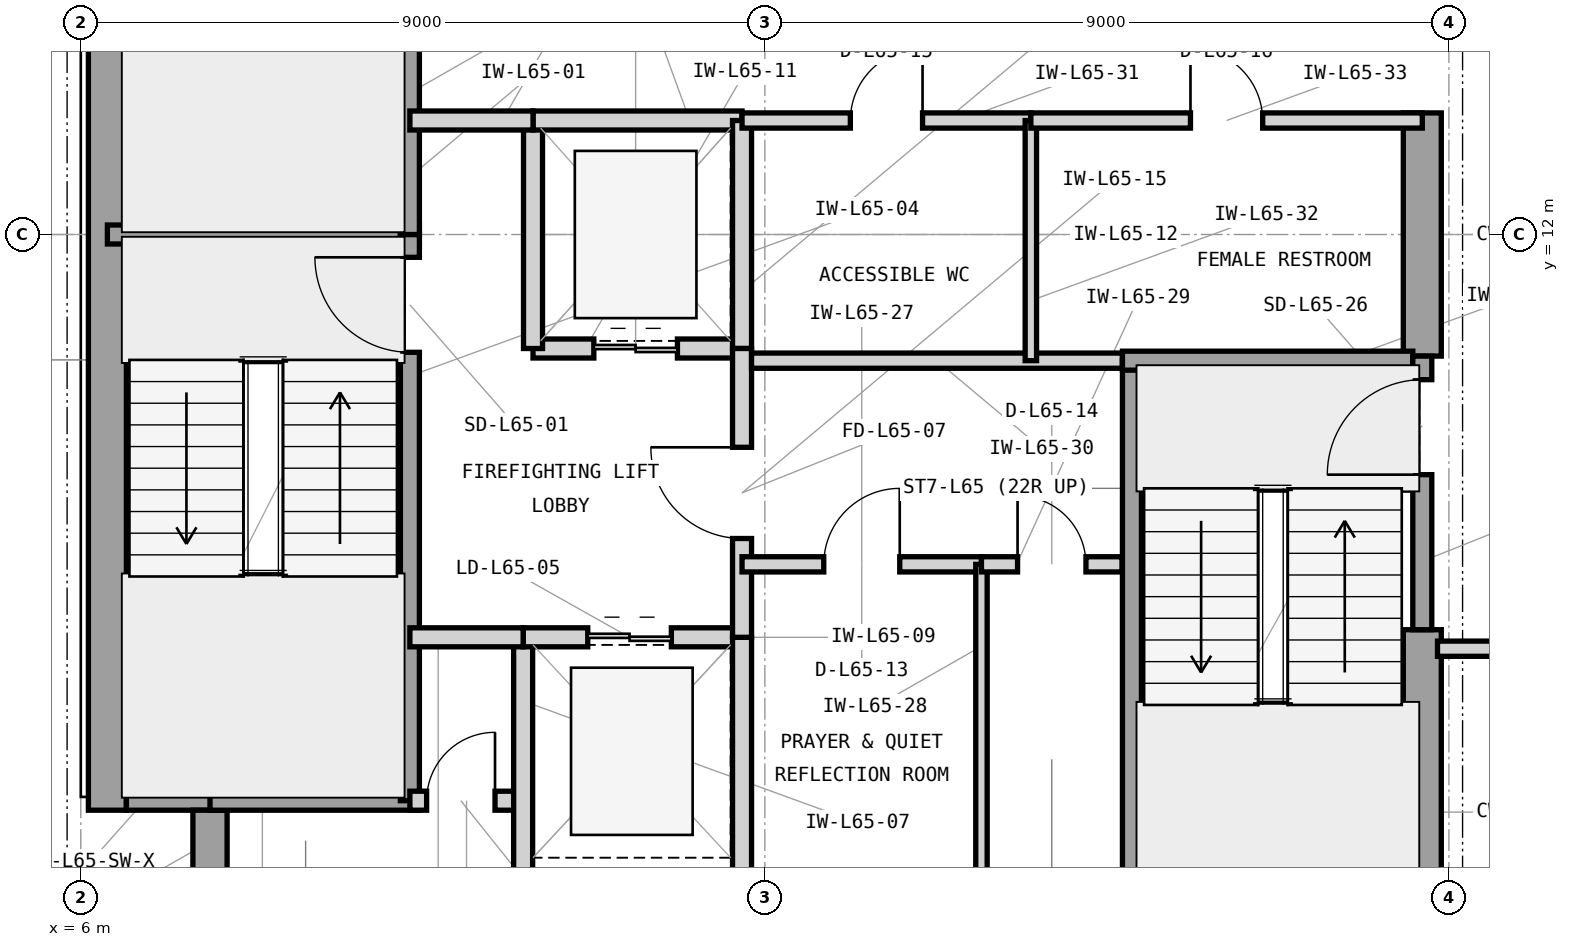
"""IFC4 building model, lengths in metres.
Left out: names, types, materials, properties, quantities, classifications, styles, units other than length and angle.
Written with IfcOpenShell. Run it as: python <this file> out.ifc"""

import sys

from ifc_helpers import new_model, si_unit, direction, frame, frame_2d, origin, place, context, subcontext, project, spatial, rectangle, extrude, element, fill, save


model = new_model("IFC4")
c1 = context("Model", 3, precision=1e-05, world=origin(), true_north=direction((0.0, 1.0)))
c2 = subcontext(c1, "Body", "Model", "MODEL_VIEW")
j1 = project(units=[si_unit("LENGTHUNIT", "METRE"), si_unit("PLANEANGLEUNIT", "RADIAN")], contexts=[c1])
p1 = place(None, origin())
s1 = spatial("IfcSite", under=j1, at=p1, CompositionType="ELEMENT")
p2 = place(p1, origin())
s2 = spatial("IfcBuilding", under=s1, at=p2, CompositionType="ELEMENT")
p3 = place(p2, frame((0.0, 0.0, 266.4)))
s3 = spatial("IfcBuildingStorey", under=s2, at=p3, CompositionType="ELEMENT", Elevation=266.4)
p4 = place(p3, frame((6.35, 4.425, 0.0), z_axis=(0.0, 0.0, 1.0), x_axis=(0.0, 1.0, 0.0)))
e1 = element("IfcWall", 1, at=p4, inside=s3, PredefinedType="SHEAR", context=c2, shape_type="SweptSolid", body=[
    extrude(rectangle(XDim=15.15, YDim=0.5, at=frame_2d((7.575, 0.0))), origin(), (0.0, 0.0, 1.0), 3.9),
])
p5 = place(p3, frame((23.65, 3.6, 0.0), z_axis=(0.0, 0.0, 1.0), x_axis=(0.0, 1.0, 0.0)))
e2 = element("IfcWall", 2, at=p5, inside=s3, PredefinedType="SHEAR", context=c2, shape_type="SweptSolid", body=[
    extrude(rectangle(XDim=3.2, YDim=0.5, at=frame_2d((1.6, 0.0))), origin(), (0.0, 0.0, 1.0), 3.9),
])
p6 = place(p3, frame((23.65, 10.4, 0.0), z_axis=(0.0, 0.0, 1.0), x_axis=(0.0, 1.0, 0.0)))
e3 = element("IfcWall", 3, at=p6, inside=s3, PredefinedType="SHEAR", context=c2, shape_type="SweptSolid", body=[
    extrude(rectangle(XDim=3.2, YDim=0.5, at=frame_2d((1.6, 0.0))), origin(), (0.0, 0.0, 1.0), 3.9),
])
p7 = place(p3, frame((6.6, 4.65, 0.0), z_axis=(0.0, 0.0, 1.0), x_axis=(1.0, 0.0, 0.0)))
e4 = element("IfcWall", 4, at=p7, inside=s3, PredefinedType="SHEAR", context=c2, shape_type="SweptSolid", body=[
    extrude(rectangle(XDim=1.325, YDim=0.45, at=frame_2d((0.663, 0.0))), origin(), (0.0, 0.0, 1.0), 3.9),
])
p8 = place(p3, frame((7.7, 3.6, 0.0), z_axis=(0.0, 0.0, 1.0), x_axis=(0.0, 1.0, 0.0)))
e5 = element("IfcWall", 5, at=p8, inside=s3, PredefinedType="SHEAR", context=c2, shape_type="SweptSolid", body=[
    extrude(rectangle(XDim=0.825, YDim=0.45, at=frame_2d((0.413, 0.0))), origin(), (0.0, 0.0, 1.0), 3.9),
])
p9 = place(p3, frame((6.35, 12.0, 0.0), z_axis=(0.0, 0.0, 1.0), x_axis=(1.0, 0.0, 0.0)))
e6 = element("IfcWall", 6, at=p9, inside=s3, PredefinedType="SHEAR", context=c2, shape_type="SweptSolid", body=[
    extrude(rectangle(XDim=4.105, YDim=0.25, at=frame_2d((2.052, 0.0))), origin(), (0.0, 0.0, 1.0), 3.9),
])
p10 = place(p3, frame((7.7, 4.55, 0.0), z_axis=(0.0, 0.0, 1.0), x_axis=(1.0, 0.0, 0.0)))
e7 = element("IfcWall", 7, at=p10, inside=s3, PredefinedType="SHEAR", context=c2, shape_type="SweptSolid", body=[
    extrude(rectangle(XDim=2.755, YDim=0.25, at=frame_2d((1.377, 0.0))), origin(), (0.0, 0.0, 1.0), 3.9),
])
p11 = place(p3, frame((10.33, 4.55, 0.0), z_axis=(0.0, 0.0, 1.0), x_axis=(0.0, 1.0, 0.0)))
e8 = element("IfcWall", 8, at=p11, inside=s3, PredefinedType="SHEAR", context=c2, shape_type="SweptSolid", body=[
    extrude(rectangle(XDim=7.45, YDim=0.25, at=frame_2d((3.725, 0.0))), origin(), (0.0, 0.0, 1.0), 3.9),
])
p12 = place(p11, frame((5.9, 0.0, 0.0)))
e9 = element("IfcOpeningElement", 9, at=p12, cuts=e8, PredefinedType="OPENING", context=c2, shape_type="SweptSolid", body=[
    extrude(rectangle(XDim=1.25, YDim=2.2, at=frame_2d((0.625, 1.1))), frame((0.0, 0.135, 0.0), z_axis=(0.0, -1.0, 0.0), x_axis=(1.0, 0.0, 0.0)), (0.0, 0.0, 1.0), 0.27),
])
p13 = place(p3, frame((10.33, 12.0, 0.0), z_axis=(0.0, 0.0, 1.0), x_axis=(0.0, 1.0, 0.0)))
e10 = element("IfcWall", 10, at=p13, inside=s3, PredefinedType="SHEAR", context=c2, shape_type="SweptSolid", body=[
    extrude(rectangle(XDim=7.45, YDim=0.25, at=frame_2d((3.725, 0.0))), origin(), (0.0, 0.0, 1.0), 3.9),
])
p14 = place(p13, frame((5.85, 0.0, 0.0)))
e11 = element("IfcOpeningElement", 11, at=p14, cuts=e10, PredefinedType="OPENING", context=c2, shape_type="SweptSolid", body=[
    extrude(rectangle(XDim=1.25, YDim=2.2, at=frame_2d((0.625, 1.1))), frame((0.0, 0.135, 0.0), z_axis=(0.0, -1.0, 0.0), x_axis=(1.0, 0.0, 0.0)), (0.0, 0.0, 1.0), 0.27),
])
p15 = place(p3, frame((10.33, 4.55, 0.0), z_axis=(0.0, 0.0, 1.0), x_axis=(1.0, 0.0, 0.0)))
e12 = element("IfcWall", 12, at=p15, inside=s3, PredefinedType="PARTITIONING", context=c2, shape_type="SweptSolid", body=[
    extrude(rectangle(XDim=1.49, YDim=0.25, at=frame_2d((0.745, 0.0))), origin(), (0.0, 0.0, 1.0), 3.705),
])
p16 = place(p15, frame((0.22, 0.0, 0.0)))
e13 = element("IfcOpeningElement", 13, at=p16, cuts=e12, PredefinedType="OPENING", context=c2, shape_type="SweptSolid", body=[
    extrude(rectangle(XDim=0.9, YDim=2.1, at=frame_2d((0.45, 1.05))), frame((0.0, 0.135, 0.0), z_axis=(0.0, -1.0, 0.0), x_axis=(1.0, 0.0, 0.0)), (0.0, 0.0, 1.0), 0.27),
])
p17 = place(p3, frame((11.82, 3.35, 0.0), z_axis=(0.0, 0.0, 1.0), x_axis=(0.0, 1.0, 0.0)))
e14 = element("IfcWall", 14, at=p17, inside=s3, PredefinedType="PARTITIONING", context=c2, shape_type="SweptSolid", body=[
    extrude(rectangle(XDim=3.35, YDim=0.25, at=frame_2d((1.675, 0.0))), origin(), (0.0, 0.0, 1.0), 3.705),
])
p18 = place(p3, frame((11.82, 6.7, 0.0), z_axis=(0.0, 0.0, 1.0), x_axis=(1.0, 0.0, 0.0)))
e15 = element("IfcWall", 15, at=p18, inside=s3, PredefinedType="PARTITIONING", context=c2, shape_type="SweptSolid", body=[
    extrude(rectangle(XDim=2.88, YDim=0.25, at=frame_2d((1.44, 0.0))), origin(), (0.0, 0.0, 1.0), 3.088),
])
p19 = place(p18, frame((0.85, 0.0, 0.0)))
e16 = element("IfcOpeningElement", 16, at=p19, cuts=e15, PredefinedType="OPENING", context=c2, shape_type="SweptSolid", body=[
    extrude(rectangle(XDim=1.1, YDim=2.25, at=frame_2d((0.55, 1.125))), frame((0.0, 0.135, 0.0), z_axis=(0.0, -1.0, 0.0), x_axis=(1.0, 0.0, 0.0)), (0.0, 0.0, 1.0), 0.27),
])
p20 = place(p3, frame((14.7, 3.35, 0.0), z_axis=(0.0, 0.0, 1.0), x_axis=(0.0, 1.0, 0.0)))
e17 = element("IfcWall", 17, at=p20, inside=s3, PredefinedType="PARTITIONING", context=c2, shape_type="SweptSolid", body=[
    extrude(rectangle(XDim=3.35, YDim=0.25, at=frame_2d((1.675, 0.0))), origin(), (0.0, 0.0, 1.0), 3.705),
])
p21 = place(p3, frame((11.95, 10.5, 0.0), z_axis=(0.0, 0.0, 1.0), x_axis=(1.0, 0.0, 0.0)))
e18 = element("IfcWall", 18, at=p21, inside=s3, PredefinedType="PARTITIONING", context=c2, shape_type="SweptSolid", body=[
    extrude(rectangle(XDim=2.75, YDim=0.25, at=frame_2d((1.375, 0.0))), origin(), (0.0, 0.0, 1.0), 3.088),
])
p22 = place(p21, frame((0.8, 0.0, 0.0)))
e19 = element("IfcOpeningElement", 19, at=p22, cuts=e18, PredefinedType="OPENING", context=c2, shape_type="SweptSolid", body=[
    extrude(rectangle(XDim=1.1, YDim=2.25, at=frame_2d((0.55, 1.125))), frame((0.0, 0.135, 0.0), z_axis=(0.0, -1.0, 0.0), x_axis=(1.0, 0.0, 0.0)), (0.0, 0.0, 1.0), 0.27),
])
p23 = place(p3, frame((11.95, 10.5, 0.0), z_axis=(0.0, 0.0, 1.0), x_axis=(0.0, 1.0, 0.0)))
e20 = element("IfcWall", 20, at=p23, inside=s3, PredefinedType="PARTITIONING", context=c2, shape_type="SweptSolid", body=[
    extrude(rectangle(XDim=3.0, YDim=0.25, at=frame_2d((1.5, 0.0))), origin(), (0.0, 0.0, 1.0), 3.705),
])
p24 = place(p3, frame((11.95, 13.5, 0.0), z_axis=(0.0, 0.0, 1.0), x_axis=(1.0, 0.0, 0.0)))
e21 = element("IfcWall", 21, at=p24, inside=s3, PredefinedType="PARTITIONING", context=c2, shape_type="SweptSolid", body=[
    extrude(rectangle(XDim=2.75, YDim=0.25, at=frame_2d((1.375, 0.0))), origin(), (0.0, 0.0, 1.0), 3.088),
])
p25 = place(p3, frame((14.7, 10.5, 0.0), z_axis=(0.0, 0.0, 1.0), x_axis=(0.0, 1.0, 0.0)))
e22 = element("IfcWall", 22, at=p25, inside=s3, PredefinedType="PARTITIONING", context=c2, shape_type="SweptSolid", body=[
    extrude(rectangle(XDim=3.0, YDim=0.25, at=frame_2d((1.5, 0.0))), origin(), (0.0, 0.0, 1.0), 3.705),
])
p26 = place(p3, frame((14.7, 6.7, 0.0), z_axis=(0.0, 0.0, 1.0), x_axis=(0.0, 1.0, 0.0)))
e23 = element("IfcWall", 23, at=p26, inside=s3, PredefinedType="PARTITIONING", context=c2, shape_type="SweptSolid", body=[
    extrude(rectangle(XDim=3.8, YDim=0.25, at=frame_2d((1.9, 0.0))), origin(), (0.0, 0.0, 1.0), 3.705),
])
p27 = place(p26, frame((1.3, 0.0, 0.0)))
e24 = element("IfcOpeningElement", 24, at=p27, cuts=e23, PredefinedType="OPENING", context=c2, shape_type="SweptSolid", body=[
    extrude(rectangle(XDim=1.2, YDim=2.2, at=frame_2d((0.6, 1.1))), frame((0.0, 0.135, 0.0), z_axis=(0.0, -1.0, 0.0), x_axis=(1.0, 0.0, 0.0)), (0.0, 0.0, 1.0), 0.27),
])
p28 = place(p3, frame((10.33, 13.5, 0.0), z_axis=(0.0, 0.0, 1.0), x_axis=(1.0, 0.0, 0.0)))
e25 = element("IfcWall", 25, at=p28, inside=s3, PredefinedType="PARTITIONING", context=c2, shape_type="SweptSolid", body=[
    extrude(rectangle(XDim=1.62, YDim=0.25, at=frame_2d((0.81, 0.0))), origin(), (0.0, 0.0, 1.0), 3.088),
])
p29 = place(p3, frame((10.33, 6.7, 0.0), z_axis=(0.0, 0.0, 1.0), x_axis=(1.0, 0.0, 0.0)))
e26 = element("IfcWall", 26, at=p29, inside=s3, PredefinedType="PARTITIONING", context=c2, shape_type="SweptSolid", body=[
    extrude(rectangle(XDim=1.49, YDim=0.25, at=frame_2d((0.745, 0.0))), origin(), (0.0, 0.0, 1.0), 3.088),
])
p30 = place(p3, frame((14.7, 7.66, 0.0), z_axis=(0.0, 0.0, 1.0), x_axis=(1.0, 0.0, 0.0)))
e27 = element("IfcWall", 27, at=p30, inside=s3, PredefinedType="PARTITIONING", context=c2, shape_type="SweptSolid", body=[
    extrude(rectangle(XDim=3.15, YDim=0.2, at=frame_2d((1.575, 0.0))), origin(), (0.0, 0.0, 1.0), 3.705),
])
p31 = place(p30, frame((1.075, 0.0, 0.0)))
e28 = element("IfcOpeningElement", 28, at=p31, cuts=e27, PredefinedType="OPENING", context=c2, shape_type="SweptSolid", body=[
    extrude(rectangle(XDim=1.0, YDim=2.15, at=frame_2d((0.5, 1.075))), frame((0.0, 0.11, 0.0), z_axis=(0.0, -1.0, 0.0), x_axis=(1.0, 0.0, 0.0)), (0.0, 0.0, 1.0), 0.22),
])
p32 = place(p3, frame((17.85, 3.35, 0.0), z_axis=(0.0, 0.0, 1.0), x_axis=(0.0, 1.0, 0.0)))
e29 = element("IfcWall", 29, at=p32, inside=s3, PredefinedType="PARTITIONING", context=c2, shape_type="SweptSolid", body=[
    extrude(rectangle(XDim=4.31, YDim=0.15, at=frame_2d((2.155, 0.0))), origin(), (0.0, 0.0, 1.0), 3.705),
])
p33 = place(p3, frame((17.85, 7.66, 0.0), z_axis=(0.0, 0.0, 1.0), x_axis=(1.0, 0.0, 0.0)))
e30 = element("IfcWall", 30, at=p33, inside=s3, PredefinedType="PARTITIONING", context=c2, shape_type="SweptSolid", body=[
    extrude(rectangle(XDim=1.85, YDim=0.2, at=frame_2d((0.925, 0.0))), origin(), (0.0, 0.0, 1.0), 3.705),
])
p34 = place(p33, frame((0.475, 0.0, 0.0)))
e31 = element("IfcOpeningElement", 31, at=p34, cuts=e30, PredefinedType="OPENING", context=c2, shape_type="SweptSolid", body=[
    extrude(rectangle(XDim=0.9, YDim=2.1, at=frame_2d((0.45, 1.05))), frame((0.0, 0.11, 0.0), z_axis=(0.0, -1.0, 0.0), x_axis=(1.0, 0.0, 0.0)), (0.0, 0.0, 1.0), 0.22),
])
p35 = place(p3, frame((14.825, 10.34, 0.0), z_axis=(0.0, 0.0, 1.0), x_axis=(1.0, 0.0, 0.0)))
e32 = element("IfcWall", 32, at=p35, inside=s3, PredefinedType="PARTITIONING", context=c2, shape_type="SweptSolid", body=[
    extrude(rectangle(XDim=4.88, YDim=0.2, at=frame_2d((2.44, 0.0))), origin(), (0.0, 0.0, 1.0), 3.088),
])
p36 = place(p3, frame((14.7, 13.5, 0.0), z_axis=(0.0, 0.0, 1.0), x_axis=(1.0, 0.0, 0.0)))
e33 = element("IfcWall", 33, at=p36, inside=s3, PredefinedType="PARTITIONING", context=c2, shape_type="SweptSolid", body=[
    extrude(rectangle(XDim=3.8, YDim=0.2, at=frame_2d((1.9, 0.0))), origin(), (0.0, 0.0, 1.0), 3.088),
])
p37 = place(p36, frame((1.425, 0.0, 0.0)))
e34 = element("IfcOpeningElement", 34, at=p37, cuts=e33, PredefinedType="OPENING", context=c2, shape_type="SweptSolid", body=[
    extrude(rectangle(XDim=0.95, YDim=2.1, at=frame_2d((0.475, 1.05))), frame((0.0, 0.11, 0.0), z_axis=(0.0, -1.0, 0.0), x_axis=(1.0, 0.0, 0.0)), (0.0, 0.0, 1.0), 0.22),
])
p38 = place(p3, frame((18.5, 10.34, 0.0), z_axis=(0.0, 0.0, 1.0), x_axis=(0.0, 1.0, 0.0)))
e35 = element("IfcWall", 35, at=p38, inside=s3, PredefinedType="PARTITIONING", context=c2, shape_type="SweptSolid", body=[
    extrude(rectangle(XDim=3.16, YDim=0.15, at=frame_2d((1.58, 0.0))), origin(), (0.0, 0.0, 1.0), 3.705),
])
p39 = place(p3, frame((18.5, 13.5, 0.0), z_axis=(0.0, 0.0, 1.0), x_axis=(1.0, 0.0, 0.0)))
e36 = element("IfcWall", 36, at=p39, inside=s3, PredefinedType="PARTITIONING", context=c2, shape_type="SweptSolid", body=[
    extrude(rectangle(XDim=5.15, YDim=0.2, at=frame_2d((2.575, 0.0))), origin(), (0.0, 0.0, 1.0), 3.088),
])
p40 = place(p39, frame((2.1, 0.0, 0.0)))
e37 = element("IfcOpeningElement", 37, at=p40, cuts=e36, PredefinedType="OPENING", context=c2, shape_type="SweptSolid", body=[
    extrude(rectangle(XDim=0.95, YDim=2.1, at=frame_2d((0.475, 1.05))), frame((0.0, 0.11, 0.0), z_axis=(0.0, -1.0, 0.0), x_axis=(1.0, 0.0, 0.0)), (0.0, 0.0, 1.0), 0.22),
])
p41 = place(p3, frame((23.85, 6.55, 0.0), z_axis=(0.0, 0.0, 1.0), x_axis=(1.0, 0.0, 0.0)))
e38 = element("IfcWall", 38, at=p41, inside=s3, PredefinedType="PARTITIONING", context=c2, shape_type="SweptSolid", body=[
    extrude(rectangle(XDim=7.35, YDim=0.2, at=frame_2d((3.675, 0.0))), origin(), (0.0, 0.0, 1.0), 3.705),
])
p42 = place(p41, frame((2.8, 0.0, 0.0)))
e39 = element("IfcOpeningElement", 39, at=p42, cuts=e38, PredefinedType="OPENING", context=c2, shape_type="SweptSolid", body=[
    extrude(rectangle(XDim=1.0, YDim=2.15, at=frame_2d((0.5, 1.075))), frame((0.0, 0.11, 0.0), z_axis=(0.0, -1.0, 0.0), x_axis=(1.0, 0.0, 0.0)), (0.0, 0.0, 1.0), 0.22),
])
p43 = place(p3, frame((19.83, 3.6, 0.0), z_axis=(0.0, 0.0, 1.0), x_axis=(0.0, 1.0, 0.0)))
e40 = element("IfcWall", 40, at=p43, inside=s3, PredefinedType="SHEAR", context=c2, shape_type="SweptSolid", body=[
    extrude(rectangle(XDim=6.74, YDim=0.25, at=frame_2d((3.37, 0.0))), origin(), (0.0, 0.0, 1.0), 3.9),
])
p44 = place(p3, frame((19.705, 10.34, 0.0), z_axis=(0.0, 0.0, 1.0), x_axis=(1.0, 0.0, 0.0)))
e41 = element("IfcWall", 41, at=p44, inside=s3, PredefinedType="SHEAR", context=c2, shape_type="SweptSolid", body=[
    extrude(rectangle(XDim=3.82, YDim=0.25, at=frame_2d((1.91, 0.0))), origin(), (0.0, 0.0, 1.0), 3.9),
])
p45 = place(p3, frame((23.65, 6.8, 0.0), z_axis=(0.0, 0.0, 1.0), x_axis=(0.0, 1.0, 0.0)))
e42 = element("IfcWall", 42, at=p45, inside=s3, PredefinedType="SHEAR", context=c2, shape_type="SweptSolid", body=[
    extrude(rectangle(XDim=3.6, YDim=0.25, at=frame_2d((1.8, 0.0))), origin(), (0.0, 0.0, 1.0), 3.9),
])
p46 = place(p45, frame((2.04, 0.0, 0.0)))
e43 = element("IfcOpeningElement", 43, at=p46, cuts=e42, PredefinedType="OPENING", context=c2, shape_type="SweptSolid", body=[
    extrude(rectangle(XDim=1.25, YDim=2.2, at=frame_2d((0.625, 1.1))), frame((0.0, 0.135, 0.0), z_axis=(0.0, -1.0, 0.0), x_axis=(1.0, 0.0, 0.0)), (0.0, 0.0, 1.0), 0.27),
])
p47 = place(p12, origin())
e44 = element("IfcDoor", 44, at=p47, inside=s3, OperationType="SINGLE_SWING_RIGHT", PredefinedType="DOOR", context=c2, shape_type="SweptSolid", body=[
    extrude(rectangle(XDim=1.25, YDim=2.2, at=frame_2d((0.625, 1.1))), frame((0.0, 0.025, 0.0), z_axis=(0.0, -1.0, 0.0), x_axis=(1.0, 0.0, 0.0)), (0.0, 0.0, 1.0), 0.05),
])
fill(e9, e44)
p48 = place(p16, origin())
e45 = element("IfcDoor", 45, at=p48, inside=s3, OperationType="SINGLE_SWING_RIGHT", PredefinedType="TRAPDOOR", context=c2, shape_type="SweptSolid", body=[
    extrude(rectangle(XDim=0.9, YDim=2.1, at=frame_2d((0.45, 1.05))), frame((0.0, 0.025, 0.0), z_axis=(0.0, -1.0, 0.0), x_axis=(1.0, 0.0, 0.0)), (0.0, 0.0, 1.0), 0.05),
])
fill(e13, e45)
p49 = place(p19, origin())
e46 = element("IfcDoor", 46, at=p49, inside=s3, OperationType="DOUBLE_DOOR_SLIDING", PredefinedType="DOOR", context=c2, shape_type="SweptSolid", body=[
    extrude(rectangle(XDim=1.1, YDim=2.25, at=frame_2d((0.55, 1.125))), frame((0.0, 0.025, 0.0), z_axis=(0.0, -1.0, 0.0), x_axis=(1.0, 0.0, 0.0)), (0.0, 0.0, 1.0), 0.05),
])
fill(e16, e46)
p50 = place(p22, origin())
e47 = element("IfcDoor", 47, at=p50, inside=s3, OperationType="DOUBLE_DOOR_SLIDING", PredefinedType="DOOR", context=c2, shape_type="SweptSolid", body=[
    extrude(rectangle(XDim=1.1, YDim=2.25, at=frame_2d((0.55, 1.125))), frame((0.0, 0.025, 0.0), z_axis=(0.0, -1.0, 0.0), x_axis=(1.0, 0.0, 0.0)), (0.0, 0.0, 1.0), 0.05),
])
fill(e19, e47)
p51 = place(p27, origin())
e48 = element("IfcDoor", 48, at=p51, inside=s3, OperationType="SINGLE_SWING_RIGHT", PredefinedType="DOOR", context=c2, shape_type="SweptSolid", body=[
    extrude(rectangle(XDim=1.2, YDim=2.2, at=frame_2d((0.6, 1.1))), frame((0.0, 0.025, 0.0), z_axis=(0.0, -1.0, 0.0), x_axis=(1.0, 0.0, 0.0)), (0.0, 0.0, 1.0), 0.05),
])
fill(e24, e48)
p52 = place(p31, origin())
e49 = element("IfcDoor", 49, at=p52, inside=s3, OperationType="SINGLE_SWING_RIGHT", PredefinedType="DOOR", context=c2, shape_type="SweptSolid", body=[
    extrude(rectangle(XDim=1.0, YDim=2.15, at=frame_2d((0.5, 1.075))), frame((0.0, 0.025, 0.0), z_axis=(0.0, -1.0, 0.0), x_axis=(1.0, 0.0, 0.0)), (0.0, 0.0, 1.0), 0.05),
])
fill(e28, e49)
p53 = place(p34, origin())
e50 = element("IfcDoor", 50, at=p53, inside=s3, OperationType="SINGLE_SWING_LEFT", PredefinedType="TRAPDOOR", context=c2, shape_type="SweptSolid", body=[
    extrude(rectangle(XDim=0.9, YDim=2.1, at=frame_2d((0.45, 1.05))), frame((0.0, 0.025, 0.0), z_axis=(0.0, -1.0, 0.0), x_axis=(1.0, 0.0, 0.0)), (0.0, 0.0, 1.0), 0.05),
])
fill(e31, e50)
p54 = place(p37, origin())
e51 = element("IfcDoor", 51, at=p54, inside=s3, OperationType="SINGLE_SWING_RIGHT", PredefinedType="DOOR", context=c2, shape_type="SweptSolid", body=[
    extrude(rectangle(XDim=0.95, YDim=2.1, at=frame_2d((0.475, 1.05))), frame((0.0, 0.025, 0.0), z_axis=(0.0, -1.0, 0.0), x_axis=(1.0, 0.0, 0.0)), (0.0, 0.0, 1.0), 0.05),
])
fill(e34, e51)
p55 = place(p40, origin())
e52 = element("IfcDoor", 52, at=p55, inside=s3, OperationType="SINGLE_SWING_LEFT", PredefinedType="DOOR", context=c2, shape_type="SweptSolid", body=[
    extrude(rectangle(XDim=0.95, YDim=2.1, at=frame_2d((0.475, 1.05))), frame((0.0, 0.025, 0.0), z_axis=(0.0, -1.0, 0.0), x_axis=(1.0, 0.0, 0.0)), (0.0, 0.0, 1.0), 0.05),
])
fill(e37, e52)
p56 = place(p46, origin())
e53 = element("IfcDoor", 53, at=p56, inside=s3, OperationType="SINGLE_SWING_LEFT", PredefinedType="DOOR", context=c2, shape_type="SweptSolid", body=[
    extrude(rectangle(XDim=1.25, YDim=2.2, at=frame_2d((0.625, 1.1))), frame((0.0, 0.025, 0.0), z_axis=(0.0, -1.0, 0.0), x_axis=(1.0, 0.0, 0.0)), (0.0, 0.0, 1.0), 0.05),
])
fill(e43, e53)
save(model, sys.argv[1])
